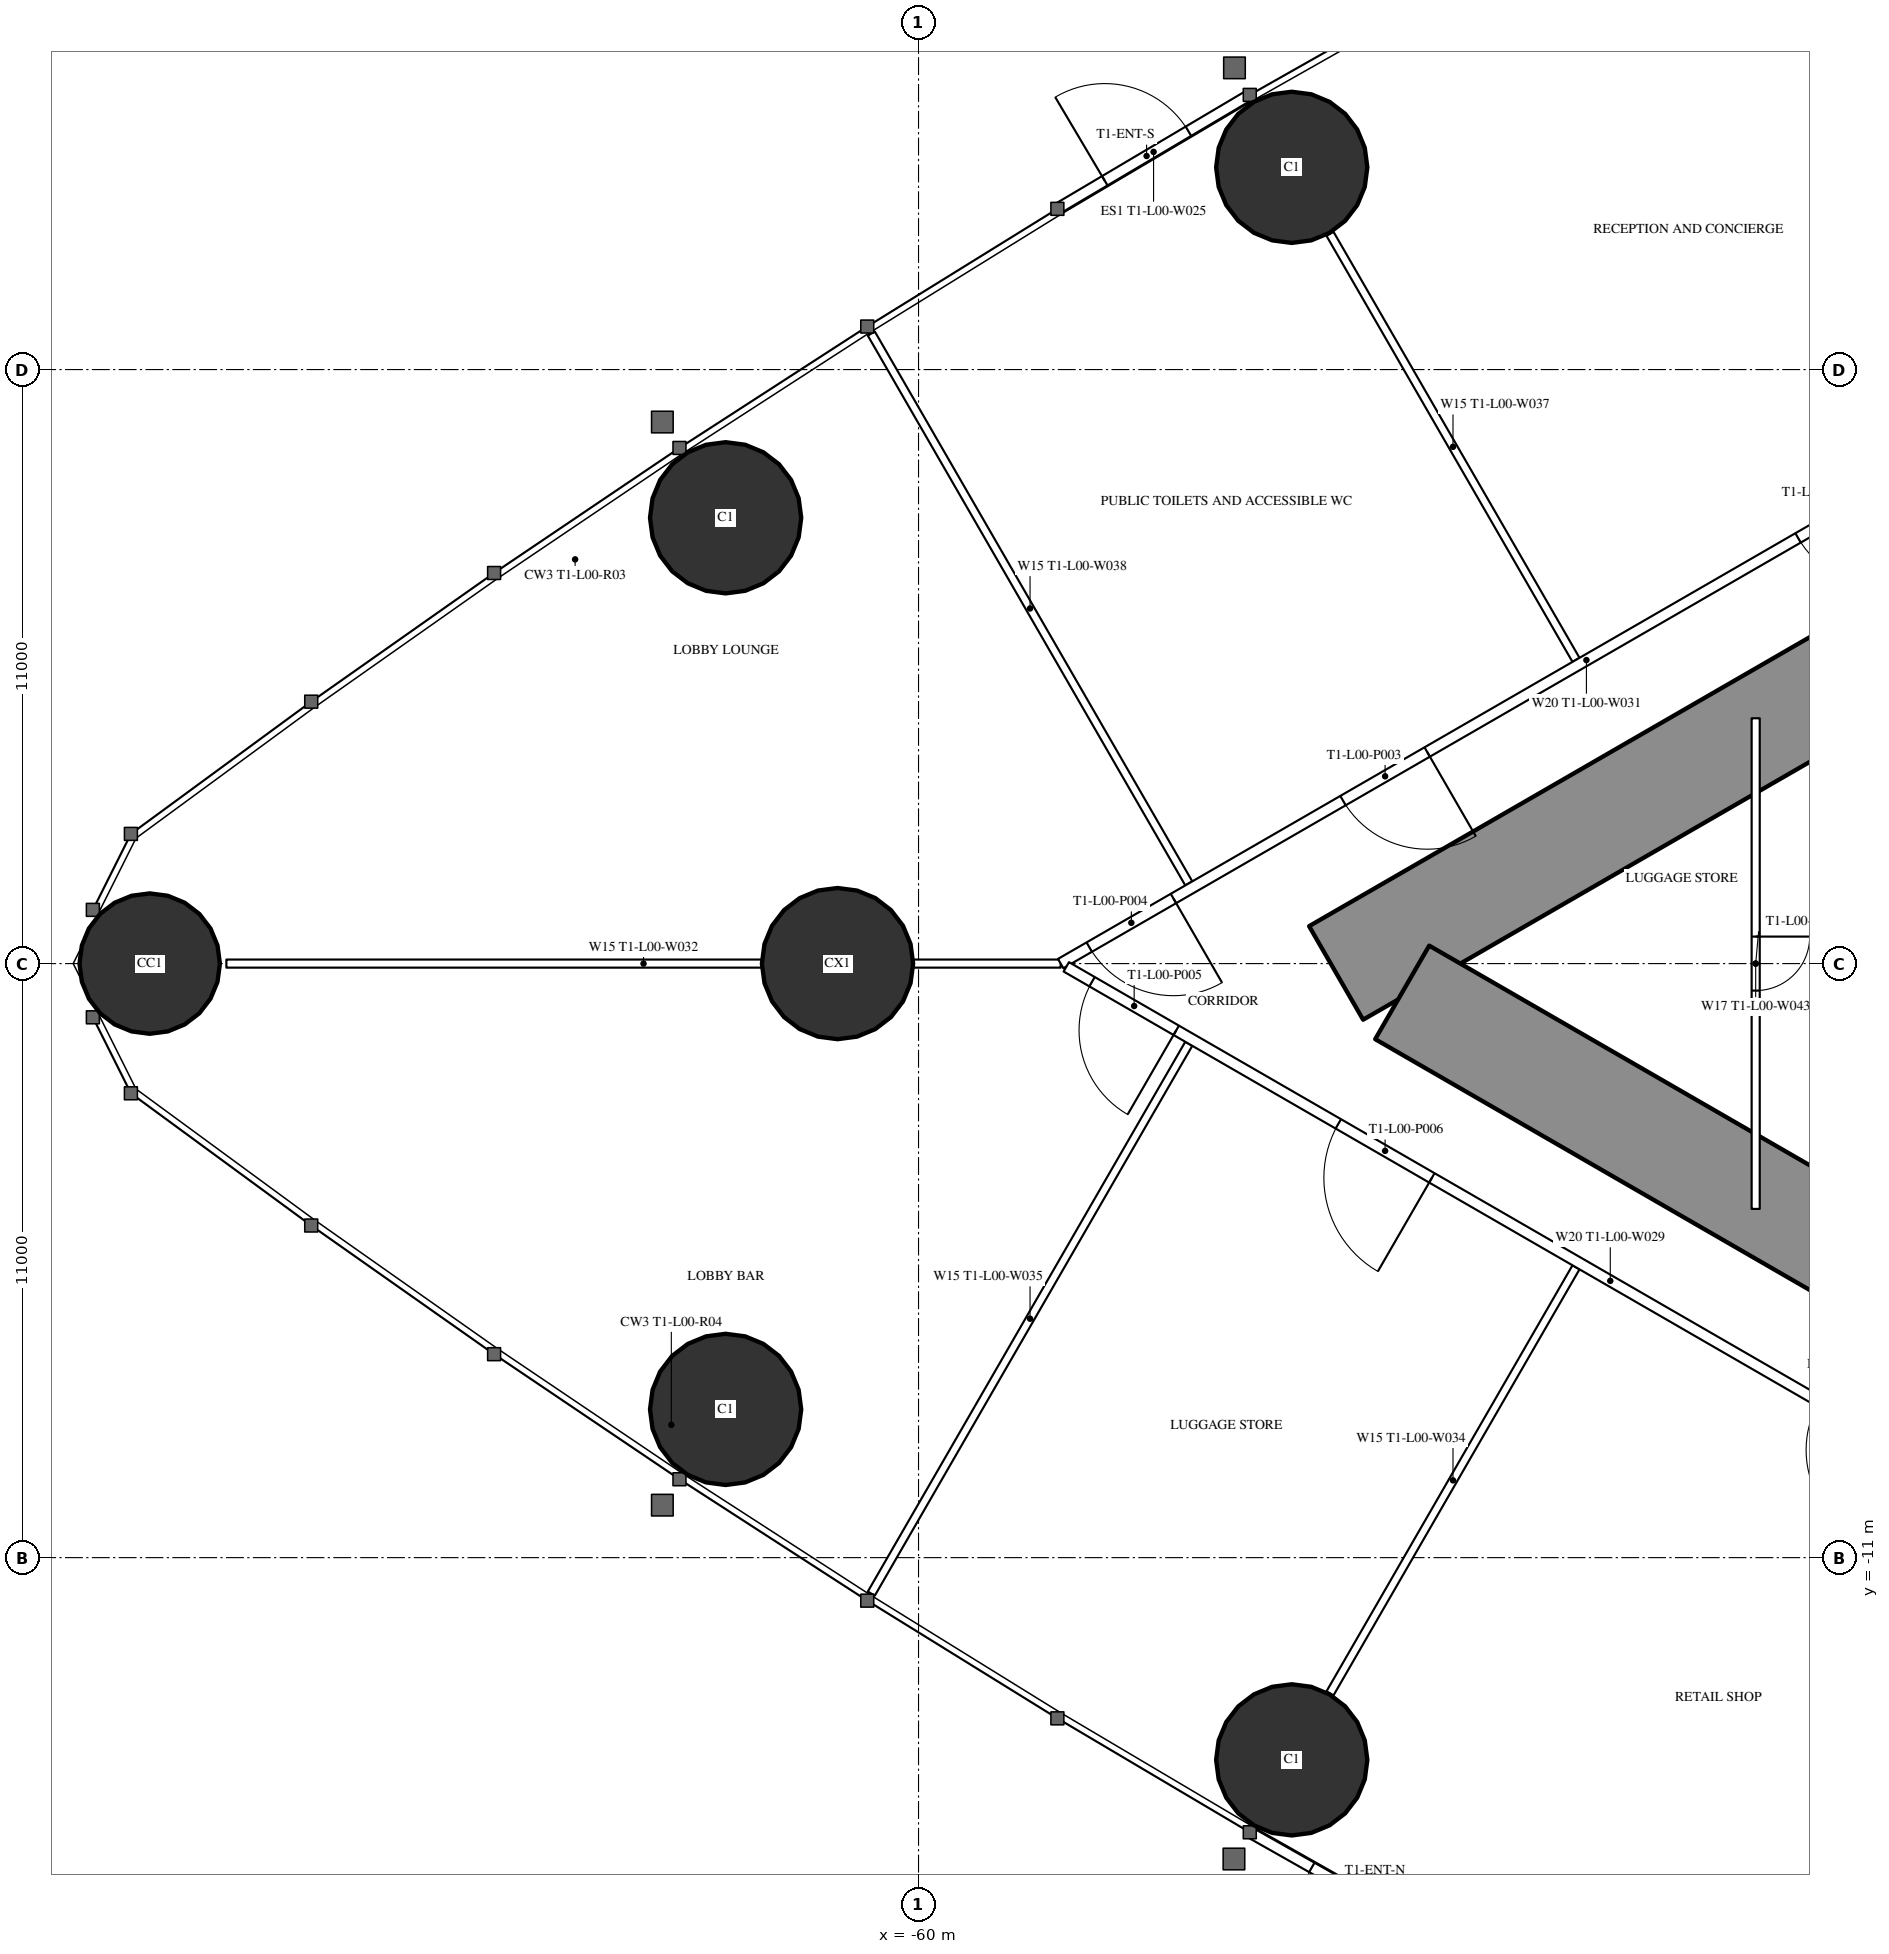
"""IFC4 building model, lengths in metres.
Left out: names, types, materials, properties, quantities, classifications, styles, units other than length and angle.
Written with IfcOpenShell. Run it as: python <this file> out.ifc"""

import sys

from ifc_helpers import new_model, si_unit, direction, frame, frame_2d, origin, origin_2d, place, context, subcontext, project, spatial, rectangle, hollow_circle, extrude, element, fill, save


model = new_model("IFC4")
c1 = context("Model", 3, precision=1e-05, world=origin(), true_north=direction((0.0, 1.0)))
c2 = subcontext(c1, "Body", "Model", "MODEL_VIEW")
j1 = project(units=[si_unit("LENGTHUNIT", "METRE"), si_unit("PLANEANGLEUNIT", "RADIAN")], contexts=[c1])
p1 = place(None, origin())
s1 = spatial("IfcSite", under=j1, at=p1, CompositionType="ELEMENT")
p2 = place(p1, origin())
s2 = spatial("IfcBuilding", under=s1, at=p2, CompositionType="ELEMENT")
p3 = place(p2, origin())
s3 = spatial("IfcBuildingStorey", under=s2, at=p3, CompositionType="ELEMENT", Elevation=0.0)
p4 = place(p3, frame((-74.235, 0.0, 0.0), z_axis=(0.0, 0.0, 1.0), x_axis=(1.0, 0.0, 0.0)))
e1 = element("IfcColumn", 1, at=p4, inside=s3, PredefinedType="COLUMN", context=c2, shape_type="SweptSolid", body=[
    extrude(hollow_circle(Radius=1.3, WallThickness=0.1, at=origin_2d()), origin(), (0.0, 0.0, 1.0), 7.2),
])
for number, where, z_axis, x_axis in (
    (2, (-63.572, -8.255, 0.0), (0.0, 0.0, 1.0), (1.0, 0.0, 0.0)),
    (3, (-53.09, -14.745, 0.0), (0.0, 0.0, 1.0), (1.0, 0.0, 0.0)),
    (4, (-53.09, 14.745, 0.0), (0.0, 0.0, 1.0), (1.0, 0.0, 0.0)),
    (5, (-63.572, 8.255, 0.0), (0.0, 0.0, 1.0), (1.0, 0.0, 0.0)),
):
    element("IfcColumn", number, at=place(p3, frame(where, z_axis=z_axis, x_axis=x_axis)), inside=s3, PredefinedType="COLUMN", context=c2, shape_type="SweptSolid", body=[
        extrude(hollow_circle(Radius=1.4, WallThickness=0.12, at=origin_2d()), origin(), (0.0, 0.0, 1.0), 7.2),
    ])
p5 = place(p3, frame((-61.5, 0.0, 0.0), z_axis=(0.0, 0.0, 1.0), x_axis=(1.0, 0.0, 0.0)))
e6 = element("IfcColumn", 6, at=p5, inside=s3, PredefinedType="COLUMN", context=c2, shape_type="SweptSolid", body=[
    extrude(hollow_circle(Radius=1.4, WallThickness=0.1, at=origin_2d()), origin(), (0.0, 0.0, 1.0), 7.2),
])
p6 = place(p3, frame((-27.2, 14.3, 0.0), z_axis=(0.0, 0.0, 1.0), x_axis=(-0.866026593062, -0.499997940104, 0.0)))
e7 = element("IfcWall", 7, at=p6, inside=s3, PredefinedType="SHEAR", context=c2, shape_type="SweptSolid", body=[
    extrude(rectangle(XDim=28.946, YDim=2.0, at=frame_2d((14.473, 0.0))), origin(), (0.0, 0.0, 1.0), 7.2),
])
p7 = place(p6, frame((4.6, 0.0, 0.0)))
e8 = element("IfcOpeningElement", 8, at=p7, cuts=e7, PredefinedType="OPENING", context=c2, shape_type="SweptSolid", body=[
    extrude(rectangle(XDim=1.0, YDim=2.2, at=frame_2d((0.5, 1.1))), frame((0.0, 1.01, 0.0), z_axis=(0.0, -1.0, 0.0), x_axis=(1.0, 0.0, 0.0)), (0.0, 0.0, 1.0), 2.02),
])
p8 = place(p6, frame((13.395, 0.0, 0.0)))
e9 = element("IfcOpeningElement", 9, at=p8, cuts=e7, PredefinedType="OPENING", context=c2, shape_type="SweptSolid", body=[
    extrude(rectangle(XDim=1.8, YDim=2.2, at=frame_2d((0.9, 1.1))), frame((0.0, 1.01, 0.0), z_axis=(0.0, -1.0, 0.0), x_axis=(1.0, 0.0, 0.0)), (0.0, 0.0, 1.0), 2.02),
])
p9 = place(p3, frame((-27.2, -14.3, 0.0), z_axis=(0.0, 0.0, 1.0), x_axis=(-0.866024044937, 0.500002353585, 0.0)))
e10 = element("IfcWall", 10, at=p9, inside=s3, PredefinedType="SHEAR", context=c2, shape_type="SweptSolid", body=[
    extrude(rectangle(XDim=27.533, YDim=2.0, at=frame_2d((13.767, 0.0))), origin(), (0.0, 0.0, 1.0), 7.2),
])
p10 = place(p9, frame((4.6, 0.0, 0.0)))
e11 = element("IfcOpeningElement", 11, at=p10, cuts=e10, PredefinedType="OPENING", context=c2, shape_type="SweptSolid", body=[
    extrude(rectangle(XDim=1.0, YDim=2.2, at=frame_2d((0.5, 1.1))), frame((0.0, 1.01, 0.0), z_axis=(0.0, -1.0, 0.0), x_axis=(1.0, 0.0, 0.0)), (0.0, 0.0, 1.0), 2.02),
])
p11 = place(p9, frame((13.395, 0.0, 0.0)))
e12 = element("IfcOpeningElement", 12, at=p11, cuts=e10, PredefinedType="OPENING", context=c2, shape_type="SweptSolid", body=[
    extrude(rectangle(XDim=1.8, YDim=2.2, at=frame_2d((0.9, 1.1))), frame((0.0, 1.01, 0.0), z_axis=(0.0, -1.0, 0.0), x_axis=(1.0, 0.0, 0.0)), (0.0, 0.0, 1.0), 2.02),
])
p12 = place(p3, frame((-57.429, 13.976, 0.0), z_axis=(0.0, 0.0, 1.0), x_axis=(0.860382514165, 0.50964882941, 0.0)))
e13 = element("IfcWall", 13, at=p12, inside=s3, PredefinedType="STANDARD", context=c2, shape_type="SweptSolid", body=[
    extrude(rectangle(XDim=4.14, YDim=0.2, at=frame_2d((2.07, 0.0))), origin(), (0.0, 0.0, 1.0), 6.85),
])
p13 = place(p12, frame((1.02, 0.0, 0.0)))
e14 = element("IfcOpeningElement", 14, at=p13, cuts=e13, PredefinedType="OPENING", context=c2, shape_type="SweptSolid", body=[
    extrude(rectangle(XDim=1.8, YDim=2.4, at=frame_2d((0.9, 1.2))), frame((0.0, 0.11, 0.0), z_axis=(0.0, -1.0, 0.0), x_axis=(1.0, 0.0, 0.0)), (0.0, 0.0, 1.0), 0.22),
])
p14 = place(p3, frame((-50.264, -18.126, 0.0), z_axis=(0.0, 0.0, 1.0), x_axis=(-0.870206768985, 0.49268669478, 0.0)))
e15 = element("IfcWall", 15, at=p14, inside=s3, PredefinedType="STANDARD", context=c2, shape_type="SweptSolid", body=[
    extrude(rectangle(XDim=4.14, YDim=0.2, at=frame_2d((2.07, 0.0))), origin(), (0.0, 0.0, 1.0), 6.85),
])
p15 = place(p14, frame((1.02, 0.0, 0.0)))
e16 = element("IfcOpeningElement", 16, at=p15, cuts=e15, PredefinedType="OPENING", context=c2, shape_type="SweptSolid", body=[
    extrude(rectangle(XDim=1.8, YDim=2.4, at=frame_2d((0.9, 1.2))), frame((0.0, 0.11, 0.0), z_axis=(0.0, -1.0, 0.0), x_axis=(1.0, 0.0, 0.0)), (0.0, 0.0, 1.0), 0.22),
])
p16 = place(p3, frame((-47.827, 5.624, 0.0), z_axis=(0.0, 0.0, 1.0), x_axis=(-0.499995404498, 0.866028056982, 0.0)))
e17 = element("IfcWall", 17, at=p16, inside=s3, PredefinedType="PARTITIONING", context=c2, shape_type="SweptSolid", body=[
    extrude(rectangle(XDim=9.11, YDim=0.15, at=frame_2d((4.555, 0.0))), origin(), (0.0, 0.0, 1.0), 5.85),
])
p17 = place(p3, frame((-54.996, 1.485, 0.0), z_axis=(0.0, 0.0, 1.0), x_axis=(-0.500002871521, 0.866023745905, 0.0)))
e18 = element("IfcWall", 18, at=p17, inside=s3, PredefinedType="PARTITIONING", context=c2, shape_type="SweptSolid", body=[
    extrude(rectangle(XDim=11.757, YDim=0.15, at=frame_2d((5.878, 0.0))), origin(), (0.0, 0.0, 1.0), 6.85),
])
p18 = place(p3, frame((-47.827, -5.624, 0.0), z_axis=(0.0, 0.0, 1.0), x_axis=(-0.499995404498, -0.866028056982, 0.0)))
e19 = element("IfcWall", 19, at=p18, inside=s3, PredefinedType="PARTITIONING", context=c2, shape_type="SweptSolid", body=[
    extrude(rectangle(XDim=9.11, YDim=0.15, at=frame_2d((4.555, 0.0))), origin(), (0.0, 0.0, 1.0), 5.85),
])
p19 = place(p3, frame((-54.996, -1.485, 0.0), z_axis=(0.0, 0.0, 1.0), x_axis=(-0.500002871521, -0.866023745905, 0.0)))
e20 = element("IfcWall", 20, at=p19, inside=s3, PredefinedType="PARTITIONING", context=c2, shape_type="SweptSolid", body=[
    extrude(rectangle(XDim=11.757, YDim=0.15, at=frame_2d((5.878, 0.0))), origin(), (0.0, 0.0, 1.0), 6.85),
])
p20 = place(p3, frame((-57.368, 0.0, 0.0), z_axis=(0.0, 0.0, 1.0), x_axis=(-1.0, 0.0, 0.0)))
e21 = element("IfcWall", 21, at=p20, inside=s3, PredefinedType="PARTITIONING", context=c2, shape_type="SweptSolid", body=[
    extrude(rectangle(XDim=15.447, YDim=0.15, at=frame_2d((7.724, 0.0))), origin(), (0.0, 0.0, 1.0), 5.85),
])
p21 = place(p3, frame((-37.9, 11.24, 0.0), z_axis=(0.0, 0.0, 1.0), x_axis=(-0.866022995118, -0.50000417191, 0.0)))
e22 = element("IfcWall", 22, at=p21, inside=s3, PredefinedType="PARTITIONING", context=c2, shape_type="SweptSolid", body=[
    extrude(rectangle(XDim=22.48, YDim=0.2, at=frame_2d((11.24, 0.0))), origin(), (0.0, 0.0, 1.0), 6.85),
])
p22 = place(p21, frame((14.644, 0.0, 0.0)))
e23 = element("IfcOpeningElement", 23, at=p22, cuts=e22, PredefinedType="OPENING", context=c2, shape_type="SweptSolid", body=[
    extrude(rectangle(XDim=1.8, YDim=2.2, at=frame_2d((0.9, 1.1))), frame((0.0, 0.11, 0.0), z_axis=(0.0, -1.0, 0.0), x_axis=(1.0, 0.0, 0.0)), (0.0, 0.0, 1.0), 0.22),
])
p23 = place(p21, frame((20.069, 0.0, 0.0)))
e24 = element("IfcOpeningElement", 24, at=p23, cuts=e22, PredefinedType="OPENING", context=c2, shape_type="SweptSolid", body=[
    extrude(rectangle(XDim=1.8, YDim=2.2, at=frame_2d((0.9, 1.1))), frame((0.0, 0.11, 0.0), z_axis=(0.0, -1.0, 0.0), x_axis=(1.0, 0.0, 0.0)), (0.0, 0.0, 1.0), 0.22),
])
p24 = place(p21, frame((4.915, 0.0, 0.0)))
e25 = element("IfcOpeningElement", 25, at=p24, cuts=e22, PredefinedType="OPENING", context=c2, shape_type="SweptSolid", body=[
    extrude(rectangle(XDim=1.8, YDim=2.2, at=frame_2d((0.9, 1.1))), frame((0.0, 0.11, 0.0), z_axis=(0.0, -1.0, 0.0), x_axis=(1.0, 0.0, 0.0)), (0.0, 0.0, 1.0), 0.22),
])
p25 = place(p3, frame((-37.12, -11.69, 0.0), z_axis=(0.0, 0.0, 1.0), x_axis=(-0.866028803602, 0.499994111297, 0.0)))
e26 = element("IfcWall", 26, at=p25, inside=s3, PredefinedType="PARTITIONING", context=c2, shape_type="SweptSolid", body=[
    extrude(rectangle(XDim=23.26, YDim=0.2, at=frame_2d((11.63, 0.0))), origin(), (0.0, 0.0, 1.0), 6.85),
])
p26 = place(p25, frame((20.909, 0.0, 0.0)))
e27 = element("IfcOpeningElement", 27, at=p26, cuts=e26, PredefinedType="OPENING", context=c2, shape_type="SweptSolid", body=[
    extrude(rectangle(XDim=1.8, YDim=2.2, at=frame_2d((0.9, 1.1))), frame((0.0, 0.11, 0.0), z_axis=(0.0, -1.0, 0.0), x_axis=(1.0, 0.0, 0.0)), (0.0, 0.0, 1.0), 0.22),
])
p27 = place(p25, frame((15.444, 0.0, 0.0)))
e28 = element("IfcOpeningElement", 28, at=p27, cuts=e26, PredefinedType="OPENING", context=c2, shape_type="SweptSolid", body=[
    extrude(rectangle(XDim=2.0, YDim=2.4, at=frame_2d((1.0, 1.2))), frame((0.0, 0.11, 0.0), z_axis=(0.0, -1.0, 0.0), x_axis=(1.0, 0.0, 0.0)), (0.0, 0.0, 1.0), 0.22),
])
p28 = place(p25, frame((5.365, 0.0, 0.0)))
e29 = element("IfcOpeningElement", 29, at=p28, cuts=e26, PredefinedType="OPENING", context=c2, shape_type="SweptSolid", body=[
    extrude(rectangle(XDim=1.8, YDim=2.2, at=frame_2d((0.9, 1.1))), frame((0.0, 0.11, 0.0), z_axis=(0.0, -1.0, 0.0), x_axis=(1.0, 0.0, 0.0)), (0.0, 0.0, 1.0), 0.22),
])
p29 = place(p3, frame((-44.5, 4.543, 0.0), z_axis=(0.0, 0.0, 1.0), x_axis=(0.0, -1.0, 0.0)))
e30 = element("IfcWall", 30, at=p29, inside=s3, PredefinedType="PARTITIONING", context=c2, shape_type="SweptSolid", body=[
    extrude(rectangle(XDim=9.085, YDim=0.15, at=frame_2d((4.543, 0.0))), origin(), (0.0, 0.0, 1.0), 6.85),
])
p30 = place(p29, frame((4.043, 0.0, 0.0)))
e31 = element("IfcOpeningElement", 31, at=p30, cuts=e30, PredefinedType="OPENING", context=c2, shape_type="SweptSolid", body=[
    extrude(rectangle(XDim=1.0, YDim=2.2, at=frame_2d((0.5, 1.1))), frame((0.0, 0.085, 0.0), z_axis=(0.0, -1.0, 0.0), x_axis=(1.0, 0.0, 0.0)), (0.0, 0.0, 1.0), 0.17),
])
p31 = place(p13, origin())
e32 = element("IfcDoor", 32, at=p31, inside=s3, OperationType="SINGLE_SWING_LEFT", PredefinedType="DOOR", context=c2, shape_type="SweptSolid", body=[
    extrude(rectangle(XDim=1.8, YDim=2.4, at=frame_2d((0.9, 1.2))), frame((0.0, 0.025, 0.0), z_axis=(0.0, -1.0, 0.0), x_axis=(1.0, 0.0, 0.0)), (0.0, 0.0, 1.0), 0.05),
])
fill(e14, e32)
p32 = place(p15, origin())
e33 = element("IfcDoor", 33, at=p32, inside=s3, OperationType="SINGLE_SWING_LEFT", PredefinedType="DOOR", context=c2, shape_type="SweptSolid", body=[
    extrude(rectangle(XDim=1.8, YDim=2.4, at=frame_2d((0.9, 1.2))), frame((0.0, 0.025, 0.0), z_axis=(0.0, -1.0, 0.0), x_axis=(1.0, 0.0, 0.0)), (0.0, 0.0, 1.0), 0.05),
])
fill(e16, e33)
p33 = place(p22, origin())
e34 = element("IfcDoor", 34, at=p33, inside=s3, OperationType="DOUBLE_DOOR_SINGLE_SWING", PredefinedType="DOOR", context=c2, shape_type="SweptSolid", body=[
    extrude(rectangle(XDim=1.8, YDim=2.2, at=frame_2d((0.9, 1.1))), frame((0.0, 0.025, 0.0), z_axis=(0.0, -1.0, 0.0), x_axis=(1.0, 0.0, 0.0)), (0.0, 0.0, 1.0), 0.05),
])
fill(e23, e34)
p34 = place(p23, origin())
e35 = element("IfcDoor", 35, at=p34, inside=s3, OperationType="DOUBLE_DOOR_SINGLE_SWING", PredefinedType="DOOR", context=c2, shape_type="SweptSolid", body=[
    extrude(rectangle(XDim=1.8, YDim=2.2, at=frame_2d((0.9, 1.1))), frame((0.0, 0.025, 0.0), z_axis=(0.0, -1.0, 0.0), x_axis=(1.0, 0.0, 0.0)), (0.0, 0.0, 1.0), 0.05),
])
fill(e24, e35)
p35 = place(p26, origin())
e36 = element("IfcDoor", 36, at=p35, inside=s3, OperationType="DOUBLE_DOOR_SINGLE_SWING", PredefinedType="DOOR", context=c2, shape_type="SweptSolid", body=[
    extrude(rectangle(XDim=1.8, YDim=2.2, at=frame_2d((0.9, 1.1))), frame((0.0, 0.025, 0.0), z_axis=(0.0, -1.0, 0.0), x_axis=(1.0, 0.0, 0.0)), (0.0, 0.0, 1.0), 0.05),
])
fill(e27, e36)
p36 = place(p27, origin())
e37 = element("IfcDoor", 37, at=p36, inside=s3, OperationType="DOUBLE_DOOR_SINGLE_SWING", PredefinedType="DOOR", context=c2, shape_type="SweptSolid", body=[
    extrude(rectangle(XDim=2.0, YDim=2.4, at=frame_2d((1.0, 1.2))), frame((0.0, 0.025, 0.0), z_axis=(0.0, -1.0, 0.0), x_axis=(1.0, 0.0, 0.0)), (0.0, 0.0, 1.0), 0.05),
])
fill(e28, e37)
p37 = place(p24, origin())
e38 = element("IfcDoor", 38, at=p37, inside=s3, OperationType="DOUBLE_DOOR_SINGLE_SWING", PredefinedType="DOOR", context=c2, shape_type="SweptSolid", body=[
    extrude(rectangle(XDim=1.8, YDim=2.2, at=frame_2d((0.9, 1.1))), frame((0.0, 0.025, 0.0), z_axis=(0.0, -1.0, 0.0), x_axis=(1.0, 0.0, 0.0)), (0.0, 0.0, 1.0), 0.05),
])
fill(e25, e38)
p38 = place(p30, origin())
e39 = element("IfcDoor", 39, at=p38, inside=s3, OperationType="SINGLE_SWING_LEFT", PredefinedType="DOOR", context=c2, shape_type="SweptSolid", body=[
    extrude(rectangle(XDim=1.0, YDim=2.2, at=frame_2d((0.5, 1.1))), frame((0.0, 0.025, 0.0), z_axis=(0.0, -1.0, 0.0), x_axis=(1.0, 0.0, 0.0)), (0.0, 0.0, 1.0), 0.05),
])
fill(e31, e39)
save(model, sys.argv[1])
